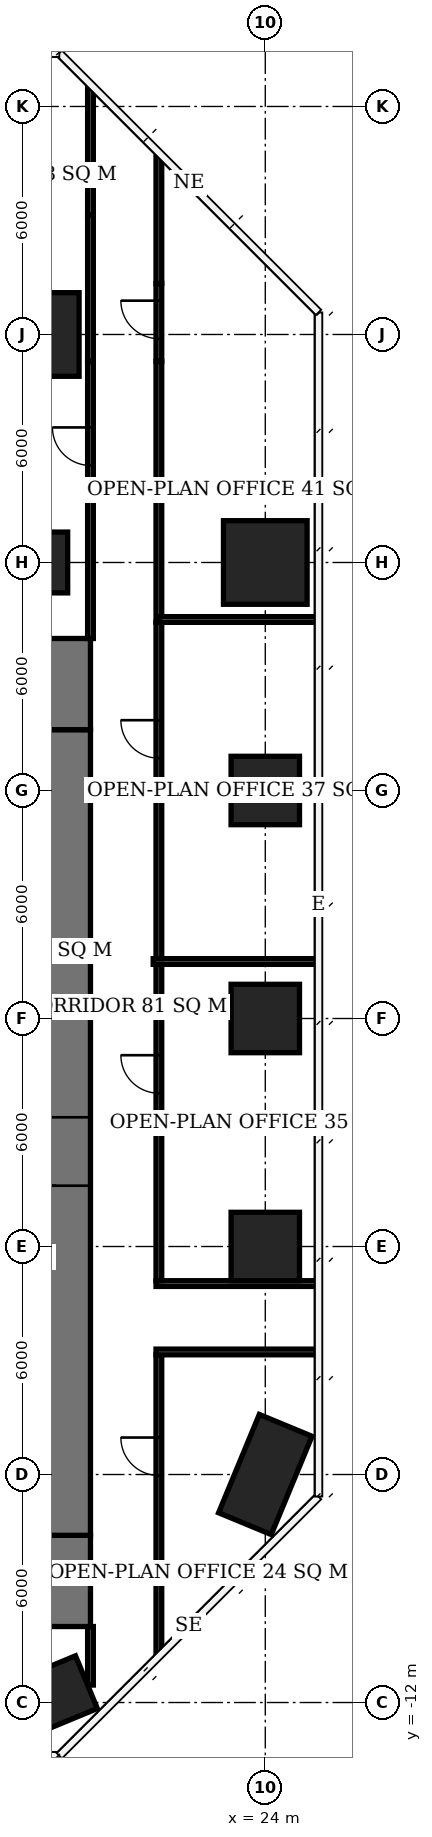
"""IFC4 building model, lengths in metres.
Left out: names, types, materials, properties, quantities, classifications, styles, units other than length and angle.
Written with IfcOpenShell. Run it as: python <this file> out.ifc"""

import sys

from ifc_helpers import new_model, si_unit, direction, frame, frame_2d, origin, origin_2d, place, context, subcontext, project, spatial, rectangle, extrude, element, fill, save


model = new_model("IFC4")
c1 = context("Model", 3, precision=1e-05, world=origin(), true_north=direction((0.0, 1.0)))
c2 = subcontext(c1, "Body", "Model", "MODEL_VIEW")
j1 = project(units=[si_unit("LENGTHUNIT", "METRE"), si_unit("PLANEANGLEUNIT", "RADIAN")], contexts=[c1])
p1 = place(None, origin())
s1 = spatial("IfcSite", under=j1, at=p1, CompositionType="ELEMENT")
p2 = place(p1, origin())
s2 = spatial("IfcBuilding", under=s1, at=p2, CompositionType="ELEMENT")
p3 = place(p2, frame((0.0, 0.0, 101.6)))
s3 = spatial("IfcBuildingStorey", under=s2, at=p3, CompositionType="ELEMENT", Elevation=101.6)
p4 = place(p3, frame((18.0, -12.0, 0.0), z_axis=(0.0, 0.0, 1.0), x_axis=(-0.923879532511, -0.382683432365, 0.0)))
e1 = element("IfcColumn", 1, at=p4, inside=s3, PredefinedType="COLUMN", context=c2, shape_type="SweptSolid", body=[
    extrude(rectangle(XDim=2.8, YDim=1.5, at=origin_2d()), origin(), (0.0, 0.0, 1.0), 3.9),
])
p5 = place(p3, frame((18.0, 18.0, 0.0), z_axis=(0.0, 0.0, 1.0), x_axis=(1.0, 0.0, 0.0)))
e2 = element("IfcColumn", 2, at=p5, inside=s3, PredefinedType="COLUMN", context=c2, shape_type="SweptSolid", body=[
    extrude(rectangle(XDim=1.6, YDim=1.6, at=origin_2d()), origin(), (0.0, 0.0, 1.0), 3.9),
])
p6 = place(p3, frame((18.0, 24.0, 0.0), z_axis=(0.0, 0.0, 1.0), x_axis=(1.0, 0.0, 0.0)))
e3 = element("IfcColumn", 3, at=p6, inside=s3, PredefinedType="COLUMN", context=c2, shape_type="SweptSolid", body=[
    extrude(rectangle(XDim=2.2, YDim=2.2, at=origin_2d()), origin(), (0.0, 0.0, 1.0), 3.9),
])
p7 = place(p3, frame((24.0, -6.0, 0.0), z_axis=(0.0, 0.0, 1.0), x_axis=(-0.382683432365, -0.923879532511, 0.0)))
e4 = element("IfcColumn", 4, at=p7, inside=s3, PredefinedType="COLUMN", context=c2, shape_type="SweptSolid", body=[
    extrude(rectangle(XDim=2.8, YDim=1.5, at=origin_2d()), origin(), (0.0, 0.0, 1.0), 3.9),
])
for number, where, z_axis, x_axis in (
    (5, (24.0, 0.0, 0.0), (0.0, 0.0, 1.0), (1.0, 0.0, 0.0)),
    (6, (24.0, 6.0, 0.0), (0.0, 0.0, 1.0), (1.0, 0.0, 0.0)),
    (7, (24.0, 12.0, 0.0), (0.0, 0.0, 1.0), (1.0, 0.0, 0.0)),
):
    element("IfcColumn", number, at=place(p3, frame(where, z_axis=z_axis, x_axis=x_axis)), inside=s3, PredefinedType="COLUMN", context=c2, shape_type="SweptSolid", body=[
        extrude(rectangle(XDim=1.8, YDim=1.8, at=origin_2d()), origin(), (0.0, 0.0, 1.0), 3.9),
    ])
p8 = place(p3, frame((24.0, 18.0, 0.0), z_axis=(0.0, 0.0, 1.0), x_axis=(1.0, 0.0, 0.0)))
e8 = element("IfcColumn", 8, at=p8, inside=s3, PredefinedType="COLUMN", context=c2, shape_type="SweptSolid", body=[
    extrude(rectangle(XDim=2.2, YDim=2.2, at=origin_2d()), origin(), (0.0, 0.0, 1.0), 3.9),
])
p9 = place(p3, frame((18.5, -7.6, 0.0), z_axis=(0.0, 0.0, 1.0), x_axis=(0.0, 1.0, 0.0)))
e9 = element("IfcWall", 9, at=p9, inside=s3, PredefinedType="SHEAR", context=c2, shape_type="SweptSolid", body=[
    extrude(rectangle(XDim=21.2, YDim=1.8, at=frame_2d((10.6, 0.0))), origin(), (0.0, 0.0, 1.0), 3.9),
])
p10 = place(p9, frame((9.2, 0.0, 0.0)))
e10 = element("IfcOpeningElement", 10, at=p10, cuts=e9, PredefinedType="OPENING", context=c2, shape_type="SweptSolid", body=[
    extrude(rectangle(XDim=1.8, YDim=2.4, at=frame_2d((0.9, 1.2))), frame((0.0, 0.91, 0.0), z_axis=(0.0, -1.0, 0.0), x_axis=(1.0, 0.0, 0.0)), (0.0, 0.0, 1.0), 1.82),
])
for number, where, z_axis, x_axis in (
    (11, (18.5, -10.0, 0.0), (0.0, 0.0, 1.0), (0.0, 1.0, 0.0)),
    (12, (18.5, 13.6, 0.0), (0.0, 0.0, 1.0), (0.0, 1.0, 0.0)),
):
    element("IfcWall", number, at=place(p3, frame(where, z_axis=z_axis, x_axis=x_axis)), inside=s3, PredefinedType="SHEAR", context=c2, shape_type="SweptSolid", body=[
        extrude(rectangle(XDim=2.4, YDim=1.8, at=frame_2d((1.2, 0.0))), origin(), (0.0, 0.0, 1.0), 3.9),
    ])
p11 = place(p3, frame((19.4, -11.541, 0.0), z_axis=(0.0, 0.0, 1.0), x_axis=(0.0, 1.0, 0.0)))
e13 = element("IfcWall", 13, at=p11, inside=s3, PredefinedType="PARTITIONING", context=c2, shape_type="SweptSolid", body=[
    extrude(rectangle(XDim=1.541, YDim=0.15, at=frame_2d((0.77, 0.0))), origin(), (0.0, 0.0, 1.0), 3.65),
])
p12 = place(p3, frame((19.4, 16.0, 0.0), z_axis=(0.0, 0.0, 1.0), x_axis=(0.0, 1.0, 0.0)))
e14 = element("IfcWall", 14, at=p12, inside=s3, PredefinedType="PARTITIONING", context=c2, shape_type="SweptSolid", body=[
    extrude(rectangle(XDim=7.29, YDim=0.15, at=frame_2d((3.645, 0.0))), origin(), (0.0, 0.0, 1.0), 3.65),
])
p13 = place(p12, frame((4.554, 0.0, 0.0)))
e15 = element("IfcOpeningElement", 15, at=p13, cuts=e14, PredefinedType="OPENING", context=c2, shape_type="SweptSolid", body=[
    extrude(rectangle(XDim=1.0, YDim=2.1, at=frame_2d((0.5, 1.05))), frame((0.0, 0.085, 0.0), z_axis=(0.0, -1.0, 0.0), x_axis=(1.0, 0.0, 0.0)), (0.0, 0.0, 1.0), 0.17),
])
p14 = place(p3, frame((19.4, 23.29, 0.0), z_axis=(0.0, 0.0, 1.0), x_axis=(0.0, 1.0, 0.0)))
e16 = element("IfcWall", 16, at=p14, inside=s3, PredefinedType="PARTITIONING", context=c2, shape_type="SweptSolid", body=[
    extrude(rectangle(XDim=3.85, YDim=0.15, at=frame_2d((1.925, 0.0))), origin(), (0.0, 0.0, 1.0), 2.65),
])
p15 = place(p3, frame((19.4, 27.14, 0.0), z_axis=(0.0, 0.0, 1.0), x_axis=(0.0, 1.0, 0.0)))
e17 = element("IfcWall", 17, at=p15, inside=s3, PredefinedType="PARTITIONING", context=c2, shape_type="SweptSolid", body=[
    extrude(rectangle(XDim=3.349, YDim=0.15, at=frame_2d((1.675, 0.0))), origin(), (0.0, 0.0, 1.0), 3.65),
])
p16 = place(p3, frame((21.2, -10.689, 0.0), z_axis=(0.0, 0.0, 1.0), x_axis=(0.0, 1.0, 0.0)))
e18 = element("IfcWall", 18, at=p16, inside=s3, PredefinedType="PARTITIONING", context=c2, shape_type="SweptSolid", body=[
    extrude(rectangle(XDim=7.839, YDim=0.15, at=frame_2d((3.919, 0.0))), origin(), (0.0, 0.0, 1.0), 3.65),
])
p17 = place(p16, frame((4.662, 0.0, 0.0)))
e19 = element("IfcOpeningElement", 19, at=p17, cuts=e18, PredefinedType="OPENING", context=c2, shape_type="SweptSolid", body=[
    extrude(rectangle(XDim=1.0, YDim=2.1, at=frame_2d((0.5, 1.05))), frame((0.0, 0.085, 0.0), z_axis=(0.0, -1.0, 0.0), x_axis=(1.0, 0.0, 0.0)), (0.0, 0.0, 1.0), 0.17),
])
p18 = place(p3, frame((21.125, -2.775, 0.0), z_axis=(0.0, 0.0, 1.0), x_axis=(1.0, 0.0, 0.0)))
e20 = element("IfcWall", 20, at=p18, inside=s3, PredefinedType="PARTITIONING", context=c2, shape_type="SweptSolid", body=[
    extrude(rectangle(XDim=4.275, YDim=0.15, at=frame_2d((2.137, 0.0))), origin(), (0.0, 0.0, 1.0), 3.65),
])
p19 = place(p3, frame((21.2, -0.9, 0.0), z_axis=(0.0, 0.0, 1.0), x_axis=(0.0, 1.0, 0.0)))
e21 = element("IfcWall", 21, at=p19, inside=s3, PredefinedType="PARTITIONING", context=c2, shape_type="SweptSolid", body=[
    extrude(rectangle(XDim=8.325, YDim=0.15, at=frame_2d((4.163, 0.0))), origin(), (0.0, 0.0, 1.0), 3.65),
])
p20 = place(p19, frame((4.934, 0.0, 0.0)))
e22 = element("IfcOpeningElement", 22, at=p20, cuts=e21, PredefinedType="OPENING", context=c2, shape_type="SweptSolid", body=[
    extrude(rectangle(XDim=1.0, YDim=2.1, at=frame_2d((0.5, 1.05))), frame((0.0, 0.085, 0.0), z_axis=(0.0, -1.0, 0.0), x_axis=(1.0, 0.0, 0.0)), (0.0, 0.0, 1.0), 0.17),
])
p21 = place(p3, frame((21.125, -0.975, 0.0), z_axis=(0.0, 0.0, 1.0), x_axis=(1.0, 0.0, 0.0)))
e23 = element("IfcWall", 23, at=p21, inside=s3, PredefinedType="PARTITIONING", context=c2, shape_type="SweptSolid", body=[
    extrude(rectangle(XDim=4.275, YDim=0.15, at=frame_2d((2.137, 0.0))), origin(), (0.0, 0.0, 1.0), 3.65),
])
p22 = place(p3, frame((21.2, 7.575, 0.0), z_axis=(0.0, 0.0, 1.0), x_axis=(0.0, 1.0, 0.0)))
e24 = element("IfcWall", 24, at=p22, inside=s3, PredefinedType="PARTITIONING", context=c2, shape_type="SweptSolid", body=[
    extrude(rectangle(XDim=8.85, YDim=0.15, at=frame_2d((4.425, 0.0))), origin(), (0.0, 0.0, 1.0), 3.65),
])
p23 = place(p22, frame((5.275, 0.0, 0.0)))
e25 = element("IfcOpeningElement", 25, at=p23, cuts=e24, PredefinedType="OPENING", context=c2, shape_type="SweptSolid", body=[
    extrude(rectangle(XDim=1.0, YDim=2.1, at=frame_2d((0.5, 1.05))), frame((0.0, 0.085, 0.0), z_axis=(0.0, -1.0, 0.0), x_axis=(1.0, 0.0, 0.0)), (0.0, 0.0, 1.0), 0.17),
])
p24 = place(p3, frame((21.05, 7.5, 0.0), z_axis=(0.0, 0.0, 1.0), x_axis=(1.0, 0.0, 0.0)))
e26 = element("IfcWall", 26, at=p24, inside=s3, PredefinedType="PARTITIONING", context=c2, shape_type="SweptSolid", body=[
    extrude(rectangle(XDim=4.35, YDim=0.15, at=frame_2d((2.175, 0.0))), origin(), (0.0, 0.0, 1.0), 3.65),
])
p25 = place(p3, frame((21.2, 16.425, 0.0), z_axis=(0.0, 0.0, 1.0), x_axis=(0.0, 1.0, 0.0)))
e27 = element("IfcWall", 27, at=p25, inside=s3, PredefinedType="PARTITIONING", context=c2, shape_type="SweptSolid", body=[
    extrude(rectangle(XDim=6.865, YDim=0.15, at=frame_2d((3.433, 0.0))), origin(), (0.0, 0.0, 1.0), 3.65),
])
p26 = place(p3, frame((21.2, 23.29, 0.0), z_axis=(0.0, 0.0, 1.0), x_axis=(0.0, 1.0, 0.0)))
e28 = element("IfcWall", 28, at=p26, inside=s3, PredefinedType="PARTITIONING", context=c2, shape_type="SweptSolid", body=[
    extrude(rectangle(XDim=2.05, YDim=0.15, at=frame_2d((1.025, 0.0))), origin(), (0.0, 0.0, 1.0), 2.65),
])
p27 = place(p26, frame((0.6, 0.0, 0.0)))
e29 = element("IfcOpeningElement", 29, at=p27, cuts=e28, PredefinedType="OPENING", context=c2, shape_type="SweptSolid", body=[
    extrude(rectangle(XDim=1.0, YDim=2.1, at=frame_2d((0.5, 1.05))), frame((0.0, 0.085, 0.0), z_axis=(0.0, -1.0, 0.0), x_axis=(1.0, 0.0, 0.0)), (0.0, 0.0, 1.0), 0.17),
])
p28 = place(p3, frame((21.2, 25.34, 0.0), z_axis=(0.0, 0.0, 1.0), x_axis=(0.0, 1.0, 0.0)))
e30 = element("IfcWall", 30, at=p28, inside=s3, PredefinedType="PARTITIONING", context=c2, shape_type="SweptSolid", body=[
    extrude(rectangle(XDim=3.349, YDim=0.15, at=frame_2d((1.674, 0.0))), origin(), (0.0, 0.0, 1.0), 3.65),
])
p29 = place(p3, frame((21.2, 16.5, 0.0), z_axis=(0.0, 0.0, 1.0), x_axis=(1.0, 0.0, 0.0)))
e31 = element("IfcWall", 31, at=p29, inside=s3, PredefinedType="PARTITIONING", context=c2, shape_type="SweptSolid", body=[
    extrude(rectangle(XDim=4.2, YDim=0.15, at=frame_2d((2.1, 0.0))), origin(), (0.0, 0.0, 1.0), 3.65),
])
p30 = place(p10, origin())
e32 = element("IfcDoor", 32, at=p30, inside=s3, OperationType="DOUBLE_DOOR_SINGLE_SWING", PredefinedType="DOOR", context=c2, shape_type="SweptSolid", body=[
    extrude(rectangle(XDim=1.8, YDim=2.4, at=frame_2d((0.9, 1.2))), frame((0.0, 0.025, 0.0), z_axis=(0.0, -1.0, 0.0), x_axis=(1.0, 0.0, 0.0)), (0.0, 0.0, 1.0), 0.05),
])
fill(e10, e32)
p31 = place(p17, origin())
e33 = element("IfcDoor", 33, at=p31, inside=s3, OperationType="SINGLE_SWING_RIGHT", PredefinedType="DOOR", context=c2, shape_type="SweptSolid", body=[
    extrude(rectangle(XDim=1.0, YDim=2.1, at=frame_2d((0.5, 1.05))), frame((0.0, 0.025, 0.0), z_axis=(0.0, -1.0, 0.0), x_axis=(1.0, 0.0, 0.0)), (0.0, 0.0, 1.0), 0.05),
])
fill(e19, e33)
p32 = place(p20, origin())
e34 = element("IfcDoor", 34, at=p32, inside=s3, OperationType="SINGLE_SWING_RIGHT", PredefinedType="DOOR", context=c2, shape_type="SweptSolid", body=[
    extrude(rectangle(XDim=1.0, YDim=2.1, at=frame_2d((0.5, 1.05))), frame((0.0, 0.025, 0.0), z_axis=(0.0, -1.0, 0.0), x_axis=(1.0, 0.0, 0.0)), (0.0, 0.0, 1.0), 0.05),
])
fill(e22, e34)
p33 = place(p23, origin())
e35 = element("IfcDoor", 35, at=p33, inside=s3, OperationType="SINGLE_SWING_RIGHT", PredefinedType="DOOR", context=c2, shape_type="SweptSolid", body=[
    extrude(rectangle(XDim=1.0, YDim=2.1, at=frame_2d((0.5, 1.05))), frame((0.0, 0.025, 0.0), z_axis=(0.0, -1.0, 0.0), x_axis=(1.0, 0.0, 0.0)), (0.0, 0.0, 1.0), 0.05),
])
fill(e25, e35)
p34 = place(p13, origin())
e36 = element("IfcDoor", 36, at=p34, inside=s3, OperationType="SINGLE_SWING_RIGHT", PredefinedType="DOOR", context=c2, shape_type="SweptSolid", body=[
    extrude(rectangle(XDim=1.0, YDim=2.1, at=frame_2d((0.5, 1.05))), frame((0.0, 0.025, 0.0), z_axis=(0.0, -1.0, 0.0), x_axis=(1.0, 0.0, 0.0)), (0.0, 0.0, 1.0), 0.05),
])
fill(e15, e36)
p35 = place(p27, origin())
e37 = element("IfcDoor", 37, at=p35, inside=s3, OperationType="SINGLE_SWING_RIGHT", PredefinedType="DOOR", context=c2, shape_type="SweptSolid", body=[
    extrude(rectangle(XDim=1.0, YDim=2.1, at=frame_2d((0.5, 1.05))), frame((0.0, 0.025, 0.0), z_axis=(0.0, -1.0, 0.0), x_axis=(1.0, 0.0, 0.0)), (0.0, 0.0, 1.0), 0.05),
])
fill(e29, e37)
save(model, sys.argv[1])
